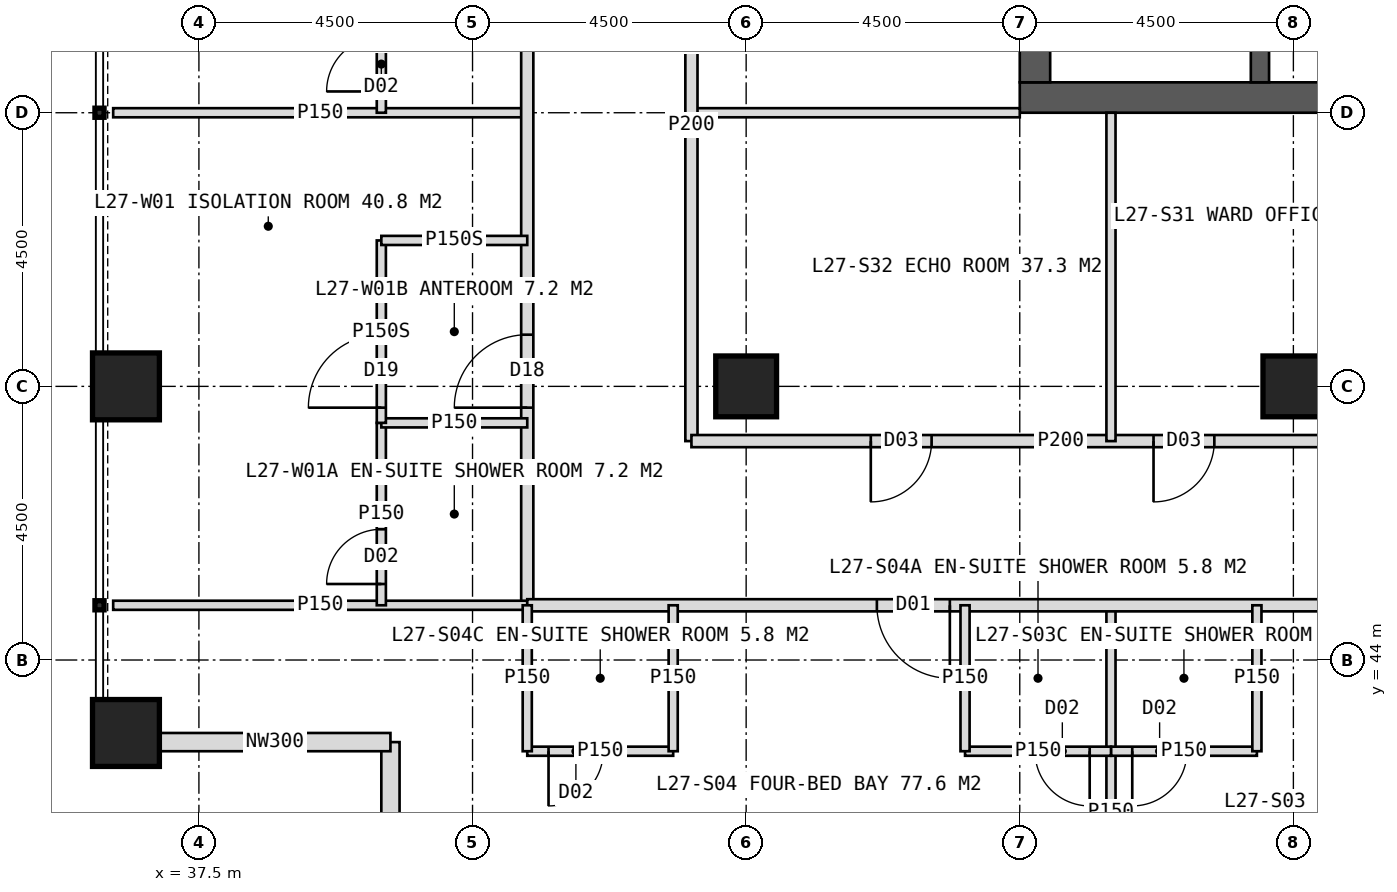
"""IFC4 building model, lengths in metres.
Left out: names, types, materials, properties, quantities, classifications, styles, units other than length and angle.
Written with IfcOpenShell. Run it as: python <this file> out.ifc"""

import sys

from ifc_helpers import new_model, si_unit, direction, frame, frame_2d, origin, origin_2d, place, context, subcontext, project, spatial, rectangle, hollow_rectangle, extrude, element, fill, save


model = new_model("IFC4")
c1 = context("Model", 3, precision=1e-05, world=origin(), true_north=direction((0.0, 1.0)))
c2 = subcontext(c1, "Body", "Model", "MODEL_VIEW")
j1 = project(units=[si_unit("LENGTHUNIT", "METRE"), si_unit("PLANEANGLEUNIT", "RADIAN")], contexts=[c1])
p1 = place(None, origin())
s1 = spatial("IfcSite", under=j1, at=p1, CompositionType="ELEMENT")
p2 = place(p1, origin())
s2 = spatial("IfcBuilding", under=s1, at=p2, CompositionType="ELEMENT")
p3 = place(p2, frame((0.0, 0.0, 116.0)))
s3 = spatial("IfcBuildingStorey", under=s2, at=p3, CompositionType="ELEMENT", Elevation=116.0)
p4 = place(p3, frame((51.0, 53.25, 0.0), z_axis=(0.0, 0.0, 1.0), x_axis=(1.0, 0.0, 0.0)))
e1 = element("IfcWall", 1, at=p4, inside=s3, PredefinedType="SHEAR", context=c2, shape_type="SweptSolid", body=[
    extrude(rectangle(XDim=18.0, YDim=0.5, at=frame_2d((9.0, 0.0))), origin(), (0.0, 0.0, 1.0), 4.0),
])
p5 = place(p4, frame((8.1, 0.0, 0.0)))
e2 = element("IfcOpeningElement", 2, at=p5, cuts=e1, PredefinedType="OPENING", context=c2, shape_type="SweptSolid", body=[
    extrude(rectangle(XDim=1.8, YDim=2.2, at=frame_2d((0.9, 1.1))), frame((0.0, 0.26, 0.0), z_axis=(0.0, -1.0, 0.0), x_axis=(1.0, 0.0, 0.0)), (0.0, 0.0, 1.0), 0.52),
])
p6 = place(p3, frame((51.25, 53.5, 0.0), z_axis=(0.0, 0.0, 1.0), x_axis=(0.0, 1.0, 0.0)))
e3 = element("IfcWall", 3, at=p6, inside=s3, PredefinedType="SHEAR", context=c2, shape_type="SweptSolid", body=[
    extrude(rectangle(XDim=17.0, YDim=0.5, at=frame_2d((8.5, 0.0))), origin(), (0.0, 0.0, 1.0), 4.0),
])
p7 = place(p6, frame((6.0, 0.0, 0.0)))
e4 = element("IfcOpeningElement", 4, at=p7, cuts=e3, PredefinedType="OPENING", context=c2, shape_type="SweptSolid", body=[
    extrude(rectangle(XDim=1.5, YDim=2.2, at=frame_2d((0.75, 1.1))), frame((0.0, 0.26, 0.0), z_axis=(0.0, -1.0, 0.0), x_axis=(1.0, 0.0, 0.0)), (0.0, 0.0, 1.0), 0.52),
])
p8 = place(p3, frame((54.95, 53.5, 0.0), z_axis=(0.0, 0.0, 1.0), x_axis=(0.0, 1.0, 0.0)))
e5 = element("IfcWall", 5, at=p8, inside=s3, PredefinedType="SHEAR", context=c2, shape_type="SweptSolid", body=[
    extrude(rectangle(XDim=17.0, YDim=0.3, at=frame_2d((8.5, 0.0))), origin(), (0.0, 0.0, 1.0), 4.0),
])
for number, where, z_axis, x_axis in (
    (6, (46.5, 48.5, 0.0), (0.0, 0.0, 1.0), (1.0, 0.0, 0.0)),
    (7, (55.5, 48.5, 0.0), (0.0, 0.0, 1.0), (1.0, 0.0, 0.0)),
):
    element("IfcColumn", number, at=place(p3, frame(where, z_axis=z_axis, x_axis=x_axis)), inside=s3, PredefinedType="COLUMN", context=c2, shape_type="SweptSolid", body=[
        extrude(hollow_rectangle(XDim=1.0, YDim=1.0, WallThickness=0.1, at=origin_2d()), origin(), (0.0, 0.0, 1.0), 4.0),
    ])
for number, where, z_axis, x_axis in (
    (8, (36.3, 42.8, 0.0), (0.0, 0.0, 1.0), (1.0, 0.0, 0.0)),
    (9, (36.3, 48.5, 0.0), (0.0, 0.0, 1.0), (1.0, 0.0, 0.0)),
):
    element("IfcColumn", number, at=place(p3, frame(where, z_axis=z_axis, x_axis=x_axis)), inside=s3, PredefinedType="COLUMN", context=c2, shape_type="SweptSolid", body=[
        extrude(hollow_rectangle(XDim=1.1, YDim=1.1, WallThickness=0.1, at=origin_2d()), origin(), (0.0, 0.0, 1.0), 4.0),
    ])
for number, where, z_axis, x_axis in (
    (10, (40.65, 38.85, 0.0), (0.0, 0.0, 1.0), (0.0, 1.0, 0.0)),
    (11, (40.65, 42.65, 0.0), (0.0, 0.0, 1.0), (-1.0, 0.0, 0.0)),
):
    element("IfcWall", number, at=place(p3, frame(where, z_axis=z_axis, x_axis=x_axis)), inside=s3, PredefinedType="ELEMENTEDWALL", context=c2, shape_type="SweptSolid", body=[
        extrude(rectangle(XDim=3.8, YDim=0.3, at=frame_2d((1.9, 0.0))), origin(), (0.0, 0.0, 1.0), 4.0),
    ])
p9 = place(p3, frame((42.9, 53.0, 0.0), z_axis=(0.0, 0.0, 1.0), x_axis=(-1.0, 0.0, 0.0)))
e12 = element("IfcWall", 12, at=p9, inside=s3, PredefinedType="PARTITIONING", context=c2, shape_type="SweptSolid", body=[
    extrude(rectangle(XDim=6.81, YDim=0.15, at=frame_2d((3.405, 0.0))), origin(), (0.0, 0.0, 1.0), 3.75),
])
p10 = place(p3, frame((42.9, 44.9, 0.0), z_axis=(0.0, 0.0, 1.0), x_axis=(0.0, 1.0, 0.0)))
e13 = element("IfcWall", 13, at=p10, inside=s3, PredefinedType="PARTITIONING", context=c2, shape_type="SweptSolid", body=[
    extrude(rectangle(XDim=34.2, YDim=0.2, at=frame_2d((17.1, 0.0))), origin(), (0.0, 0.0, 1.0), 3.75),
])
p11 = place(p10, frame((3.25, 0.0, 0.0)))
e14 = element("IfcOpeningElement", 14, at=p11, cuts=e13, PredefinedType="OPENING", context=c2, shape_type="SweptSolid", body=[
    extrude(rectangle(XDim=1.2, YDim=2.2, at=frame_2d((0.6, 1.1))), frame((0.0, 0.11, 0.0), z_axis=(0.0, -1.0, 0.0), x_axis=(1.0, 0.0, 0.0)), (0.0, 0.0, 1.0), 0.22),
])
p12 = place(p10, frame((10.75, 0.0, 0.0)))
e15 = element("IfcOpeningElement", 15, at=p12, cuts=e13, PredefinedType="OPENING", context=c2, shape_type="SweptSolid", body=[
    extrude(rectangle(XDim=1.2, YDim=2.2, at=frame_2d((0.6, 1.1))), frame((0.0, 0.11, 0.0), z_axis=(0.0, -1.0, 0.0), x_axis=(1.0, 0.0, 0.0)), (0.0, 0.0, 1.0), 0.22),
])
p13 = place(p10, frame((19.75, 0.0, 0.0)))
e16 = element("IfcOpeningElement", 16, at=p13, cuts=e13, PredefinedType="OPENING", context=c2, shape_type="SweptSolid", body=[
    extrude(rectangle(XDim=1.2, YDim=2.2, at=frame_2d((0.6, 1.1))), frame((0.0, 0.11, 0.0), z_axis=(0.0, -1.0, 0.0), x_axis=(1.0, 0.0, 0.0)), (0.0, 0.0, 1.0), 0.22),
])
p14 = place(p10, frame((28.75, 0.0, 0.0)))
e17 = element("IfcOpeningElement", 17, at=p14, cuts=e13, PredefinedType="OPENING", context=c2, shape_type="SweptSolid", body=[
    extrude(rectangle(XDim=1.2, YDim=2.2, at=frame_2d((0.6, 1.1))), frame((0.0, 0.11, 0.0), z_axis=(0.0, -1.0, 0.0), x_axis=(1.0, 0.0, 0.0)), (0.0, 0.0, 1.0), 0.22),
])
p15 = place(p3, frame((42.9, 44.9, 0.0), z_axis=(0.0, 0.0, 1.0), x_axis=(-1.0, 0.0, 0.0)))
e18 = element("IfcWall", 18, at=p15, inside=s3, PredefinedType="PARTITIONING", context=c2, shape_type="SweptSolid", body=[
    extrude(rectangle(XDim=6.81, YDim=0.15, at=frame_2d((3.405, 0.0))), origin(), (0.0, 0.0, 1.0), 3.75),
])
p16 = place(p3, frame((40.5, 44.9, 0.0), z_axis=(0.0, 0.0, 1.0), x_axis=(0.0, 1.0, 0.0)))
e19 = element("IfcWall", 19, at=p16, inside=s3, PredefinedType="PARTITIONING", context=c2, shape_type="SweptSolid", body=[
    extrude(rectangle(XDim=3.0, YDim=0.15, at=frame_2d((1.5, 0.0))), origin(), (0.0, 0.0, 1.0), 3.75),
])
p17 = place(p16, frame((0.35, 0.0, 0.0)))
e20 = element("IfcOpeningElement", 20, at=p17, cuts=e19, PredefinedType="OPENING", context=c2, shape_type="SweptSolid", body=[
    extrude(rectangle(XDim=0.9, YDim=2.1, at=frame_2d((0.45, 1.05))), frame((0.0, 0.085, 0.0), z_axis=(0.0, -1.0, 0.0), x_axis=(1.0, 0.0, 0.0)), (0.0, 0.0, 1.0), 0.17),
])
p18 = place(p3, frame((42.9, 47.9, 0.0), z_axis=(0.0, 0.0, 1.0), x_axis=(-1.0, 0.0, 0.0)))
e21 = element("IfcWall", 21, at=p18, inside=s3, PredefinedType="PARTITIONING", context=c2, shape_type="SweptSolid", body=[
    extrude(rectangle(XDim=2.4, YDim=0.15, at=frame_2d((1.2, 0.0))), origin(), (0.0, 0.0, 1.0), 3.75),
])
p19 = place(p3, frame((40.5, 47.9, 0.0), z_axis=(0.0, 0.0, 1.0), x_axis=(0.0, 1.0, 0.0)))
e22 = element("IfcWall", 22, at=p19, inside=s3, PredefinedType="PARTITIONING", context=c2, shape_type="SweptSolid", body=[
    extrude(rectangle(XDim=3.0, YDim=0.15, at=frame_2d((1.5, 0.0))), origin(), (0.0, 0.0, 1.0), 3.75),
])
p20 = place(p19, frame((0.25, 0.0, 0.0)))
e23 = element("IfcOpeningElement", 23, at=p20, cuts=e22, PredefinedType="OPENING", context=c2, shape_type="SweptSolid", body=[
    extrude(rectangle(XDim=1.2, YDim=2.2, at=frame_2d((0.6, 1.1))), frame((0.0, 0.085, 0.0), z_axis=(0.0, -1.0, 0.0), x_axis=(1.0, 0.0, 0.0)), (0.0, 0.0, 1.0), 0.17),
])
p21 = place(p3, frame((42.9, 50.9, 0.0), z_axis=(0.0, 0.0, 1.0), x_axis=(-1.0, 0.0, 0.0)))
e24 = element("IfcWall", 24, at=p21, inside=s3, PredefinedType="PARTITIONING", context=c2, shape_type="SweptSolid", body=[
    extrude(rectangle(XDim=2.4, YDim=0.15, at=frame_2d((1.2, 0.0))), origin(), (0.0, 0.0, 1.0), 3.75),
])
p22 = place(p3, frame((40.5, 53.0, 0.0), z_axis=(0.0, 0.0, 1.0), x_axis=(0.0, 1.0, 0.0)))
e25 = element("IfcWall", 25, at=p22, inside=s3, PredefinedType="PARTITIONING", context=c2, shape_type="SweptSolid", body=[
    extrude(rectangle(XDim=2.4, YDim=0.15, at=frame_2d((1.2, 0.0))), origin(), (0.0, 0.0, 1.0), 3.75),
])
p23 = place(p22, frame((0.35, 0.0, 0.0)))
e26 = element("IfcOpeningElement", 26, at=p23, cuts=e25, PredefinedType="OPENING", context=c2, shape_type="SweptSolid", body=[
    extrude(rectangle(XDim=0.9, YDim=2.1, at=frame_2d((0.45, 1.05))), frame((0.0, 0.085, 0.0), z_axis=(0.0, -1.0, 0.0), x_axis=(1.0, 0.0, 0.0)), (0.0, 0.0, 1.0), 0.17),
])
p24 = place(p3, frame((51.0, 53.0, 0.0), z_axis=(0.0, 0.0, 1.0), x_axis=(-1.0, 0.0, 0.0)))
e27 = element("IfcWall", 27, at=p24, inside=s3, PredefinedType="PARTITIONING", context=c2, shape_type="SweptSolid", body=[
    extrude(rectangle(XDim=5.4, YDim=0.15, at=frame_2d((2.7, 0.0))), origin(), (0.0, 0.0, 1.0), 3.75),
])
p25 = place(p3, frame((45.6, 47.6, 0.0), z_axis=(0.0, 0.0, 1.0), x_axis=(0.0, 1.0, 0.0)))
e28 = element("IfcWall", 28, at=p25, inside=s3, PredefinedType="PARTITIONING", context=c2, shape_type="SweptSolid", body=[
    extrude(rectangle(XDim=10.4, YDim=0.2, at=frame_2d((5.2, 0.0))), origin(), (0.0, 0.0, 1.0), 3.75),
])
p26 = place(p25, frame((7.4, 0.0, 0.0)))
e29 = element("IfcOpeningElement", 29, at=p26, cuts=e28, PredefinedType="OPENING", context=c2, shape_type="SweptSolid", body=[
    extrude(rectangle(XDim=1.0, YDim=2.1, at=frame_2d((0.5, 1.05))), frame((0.0, 0.11, 0.0), z_axis=(0.0, -1.0, 0.0), x_axis=(1.0, 0.0, 0.0)), (0.0, 0.0, 1.0), 0.22),
])
p27 = place(p3, frame((52.5, 44.9, 0.0), z_axis=(0.0, 0.0, 1.0), x_axis=(0.0, -1.0, 0.0)))
e30 = element("IfcWall", 30, at=p27, inside=s3, PredefinedType="PARTITIONING", context=c2, shape_type="SweptSolid", body=[
    extrude(rectangle(XDim=6.81, YDim=0.15, at=frame_2d((3.405, 0.0))), origin(), (0.0, 0.0, 1.0), 3.75),
])
p28 = place(p3, frame((77.1, 44.9, 0.0), z_axis=(0.0, 0.0, 1.0), x_axis=(-1.0, 0.0, 0.0)))
e31 = element("IfcWall", 31, at=p28, inside=s3, PredefinedType="PARTITIONING", context=c2, shape_type="SweptSolid", body=[
    extrude(rectangle(XDim=34.2, YDim=0.2, at=frame_2d((17.1, 0.0))), origin(), (0.0, 0.0, 1.0), 3.75),
])
p29 = place(p28, frame((3.25, 0.0, 0.0)))
e32 = element("IfcOpeningElement", 32, at=p29, cuts=e31, PredefinedType="OPENING", context=c2, shape_type="SweptSolid", body=[
    extrude(rectangle(XDim=1.2, YDim=2.2, at=frame_2d((0.6, 1.1))), frame((0.0, 0.11, 0.0), z_axis=(0.0, -1.0, 0.0), x_axis=(1.0, 0.0, 0.0)), (0.0, 0.0, 1.0), 0.22),
])
p30 = place(p28, frame((9.25, 0.0, 0.0)))
e33 = element("IfcOpeningElement", 33, at=p30, cuts=e31, PredefinedType="OPENING", context=c2, shape_type="SweptSolid", body=[
    extrude(rectangle(XDim=1.2, YDim=2.2, at=frame_2d((0.6, 1.1))), frame((0.0, 0.11, 0.0), z_axis=(0.0, -1.0, 0.0), x_axis=(1.0, 0.0, 0.0)), (0.0, 0.0, 1.0), 0.22),
])
p31 = place(p28, frame((18.25, 0.0, 0.0)))
e34 = element("IfcOpeningElement", 34, at=p31, cuts=e31, PredefinedType="OPENING", context=c2, shape_type="SweptSolid", body=[
    extrude(rectangle(XDim=1.2, YDim=2.2, at=frame_2d((0.6, 1.1))), frame((0.0, 0.11, 0.0), z_axis=(0.0, -1.0, 0.0), x_axis=(1.0, 0.0, 0.0)), (0.0, 0.0, 1.0), 0.22),
])
p32 = place(p28, frame((27.25, 0.0, 0.0)))
e35 = element("IfcOpeningElement", 35, at=p32, cuts=e31, PredefinedType="OPENING", context=c2, shape_type="SweptSolid", body=[
    extrude(rectangle(XDim=1.2, YDim=2.2, at=frame_2d((0.6, 1.1))), frame((0.0, 0.11, 0.0), z_axis=(0.0, -1.0, 0.0), x_axis=(1.0, 0.0, 0.0)), (0.0, 0.0, 1.0), 0.22),
])
p33 = place(p3, frame((54.9, 42.5, 0.0), z_axis=(0.0, 0.0, 1.0), x_axis=(-1.0, 0.0, 0.0)))
e36 = element("IfcWall", 36, at=p33, inside=s3, PredefinedType="PARTITIONING", context=c2, shape_type="SweptSolid", body=[
    extrude(rectangle(XDim=2.4, YDim=0.15, at=frame_2d((1.2, 0.0))), origin(), (0.0, 0.0, 1.0), 3.75),
])
p34 = place(p33, frame((1.15, 0.0, 0.0)))
e37 = element("IfcOpeningElement", 37, at=p34, cuts=e36, PredefinedType="OPENING", context=c2, shape_type="SweptSolid", body=[
    extrude(rectangle(XDim=0.9, YDim=2.1, at=frame_2d((0.45, 1.05))), frame((0.0, 0.085, 0.0), z_axis=(0.0, -1.0, 0.0), x_axis=(1.0, 0.0, 0.0)), (0.0, 0.0, 1.0), 0.17),
])
p35 = place(p3, frame((54.9, 44.9, 0.0), z_axis=(0.0, 0.0, 1.0), x_axis=(0.0, -1.0, 0.0)))
e38 = element("IfcWall", 38, at=p35, inside=s3, PredefinedType="PARTITIONING", context=c2, shape_type="SweptSolid", body=[
    extrude(rectangle(XDim=2.4, YDim=0.15, at=frame_2d((1.2, 0.0))), origin(), (0.0, 0.0, 1.0), 3.75),
])
p36 = place(p3, frame((52.5, 42.5, 0.0), z_axis=(0.0, 0.0, 1.0), x_axis=(-1.0, 0.0, 0.0)))
e39 = element("IfcWall", 39, at=p36, inside=s3, PredefinedType="PARTITIONING", context=c2, shape_type="SweptSolid", body=[
    extrude(rectangle(XDim=2.4, YDim=0.15, at=frame_2d((1.2, 0.0))), origin(), (0.0, 0.0, 1.0), 3.75),
])
p37 = place(p36, frame((0.35, 0.0, 0.0)))
e40 = element("IfcOpeningElement", 40, at=p37, cuts=e39, PredefinedType="OPENING", context=c2, shape_type="SweptSolid", body=[
    extrude(rectangle(XDim=0.9, YDim=2.1, at=frame_2d((0.45, 1.05))), frame((0.0, 0.085, 0.0), z_axis=(0.0, -1.0, 0.0), x_axis=(1.0, 0.0, 0.0)), (0.0, 0.0, 1.0), 0.17),
])
p38 = place(p3, frame((50.1, 44.9, 0.0), z_axis=(0.0, 0.0, 1.0), x_axis=(0.0, -1.0, 0.0)))
e41 = element("IfcWall", 41, at=p38, inside=s3, PredefinedType="PARTITIONING", context=c2, shape_type="SweptSolid", body=[
    extrude(rectangle(XDim=2.4, YDim=0.15, at=frame_2d((1.2, 0.0))), origin(), (0.0, 0.0, 1.0), 3.75),
])
p39 = place(p3, frame((45.3, 42.5, 0.0), z_axis=(0.0, 0.0, 1.0), x_axis=(-1.0, 0.0, 0.0)))
e42 = element("IfcWall", 42, at=p39, inside=s3, PredefinedType="PARTITIONING", context=c2, shape_type="SweptSolid", body=[
    extrude(rectangle(XDim=2.4, YDim=0.15, at=frame_2d((1.2, 0.0))), origin(), (0.0, 0.0, 1.0), 3.75),
])
p40 = place(p39, frame((1.15, 0.0, 0.0)))
e43 = element("IfcOpeningElement", 43, at=p40, cuts=e42, PredefinedType="OPENING", context=c2, shape_type="SweptSolid", body=[
    extrude(rectangle(XDim=0.9, YDim=2.1, at=frame_2d((0.45, 1.05))), frame((0.0, 0.085, 0.0), z_axis=(0.0, -1.0, 0.0), x_axis=(1.0, 0.0, 0.0)), (0.0, 0.0, 1.0), 0.17),
])
for number, where, z_axis, x_axis in (
    (44, (45.3, 44.9, 0.0), (0.0, 0.0, 1.0), (0.0, -1.0, 0.0)),
    (45, (42.9, 44.9, 0.0), (0.0, 0.0, 1.0), (0.0, -1.0, 0.0)),
):
    element("IfcWall", number, at=place(p3, frame(where, z_axis=z_axis, x_axis=x_axis)), inside=s3, PredefinedType="PARTITIONING", context=c2, shape_type="SweptSolid", body=[
        extrude(rectangle(XDim=2.4, YDim=0.15, at=frame_2d((1.2, 0.0))), origin(), (0.0, 0.0, 1.0), 3.75),
    ])
p41 = place(p3, frame((57.75, 47.6, 0.0), z_axis=(0.0, 0.0, 1.0), x_axis=(-1.0, 0.0, 0.0)))
e46 = element("IfcWall", 46, at=p41, inside=s3, PredefinedType="PARTITIONING", context=c2, shape_type="SweptSolid", body=[
    extrude(rectangle(XDim=12.15, YDim=0.2, at=frame_2d((6.075, 0.0))), origin(), (0.0, 0.0, 1.0), 3.75),
])
p42 = place(p41, frame((3.55, 0.0, 0.0)))
e47 = element("IfcOpeningElement", 47, at=p42, cuts=e46, PredefinedType="OPENING", context=c2, shape_type="SweptSolid", body=[
    extrude(rectangle(XDim=1.0, YDim=2.1, at=frame_2d((0.5, 1.05))), frame((0.0, 0.11, 0.0), z_axis=(0.0, -1.0, 0.0), x_axis=(1.0, 0.0, 0.0)), (0.0, 0.0, 1.0), 0.22),
])
p43 = place(p41, frame((8.2, 0.0, 0.0)))
e48 = element("IfcOpeningElement", 48, at=p43, cuts=e46, PredefinedType="OPENING", context=c2, shape_type="SweptSolid", body=[
    extrude(rectangle(XDim=1.0, YDim=2.1, at=frame_2d((0.5, 1.05))), frame((0.0, 0.11, 0.0), z_axis=(0.0, -1.0, 0.0), x_axis=(1.0, 0.0, 0.0)), (0.0, 0.0, 1.0), 0.22),
])
p44 = place(p3, frame((52.5, 53.0, 0.0), z_axis=(0.0, 0.0, 1.0), x_axis=(0.0, -1.0, 0.0)))
e49 = element("IfcWall", 49, at=p44, inside=s3, PredefinedType="PARTITIONING", context=c2, shape_type="SweptSolid", body=[
    extrude(rectangle(XDim=5.4, YDim=0.15, at=frame_2d((2.7, 0.0))), origin(), (0.0, 0.0, 1.0), 3.75),
])
p45 = place(p20, origin())
e50 = element("IfcDoor", 50, at=p45, inside=s3, OperationType="SINGLE_SWING_LEFT", PredefinedType="DOOR", context=c2, shape_type="SweptSolid", body=[
    extrude(rectangle(XDim=1.2, YDim=2.2, at=frame_2d((0.6, 1.1))), frame((0.0, 0.025, 0.0), z_axis=(0.0, -1.0, 0.0), x_axis=(1.0, 0.0, 0.0)), (0.0, 0.0, 1.0), 0.05),
])
fill(e23, e50)
p46 = place(p11, origin())
e51 = element("IfcDoor", 51, at=p46, inside=s3, OperationType="SINGLE_SWING_LEFT", PredefinedType="DOOR", context=c2, shape_type="SweptSolid", body=[
    extrude(rectangle(XDim=1.2, YDim=2.2, at=frame_2d((0.6, 1.1))), frame((0.0, 0.025, 0.0), z_axis=(0.0, -1.0, 0.0), x_axis=(1.0, 0.0, 0.0)), (0.0, 0.0, 1.0), 0.05),
])
fill(e14, e51)
p47 = place(p17, origin())
e52 = element("IfcDoor", 52, at=p47, inside=s3, OperationType="SINGLE_SWING_LEFT", PredefinedType="DOOR", context=c2, shape_type="SweptSolid", body=[
    extrude(rectangle(XDim=0.9, YDim=2.1, at=frame_2d((0.45, 1.05))), frame((0.0, 0.025, 0.0), z_axis=(0.0, -1.0, 0.0), x_axis=(1.0, 0.0, 0.0)), (0.0, 0.0, 1.0), 0.05),
])
fill(e20, e52)
p48 = place(p23, origin())
e53 = element("IfcDoor", 53, at=p48, inside=s3, OperationType="SINGLE_SWING_LEFT", PredefinedType="DOOR", context=c2, shape_type="SweptSolid", body=[
    extrude(rectangle(XDim=0.9, YDim=2.1, at=frame_2d((0.45, 1.05))), frame((0.0, 0.025, 0.0), z_axis=(0.0, -1.0, 0.0), x_axis=(1.0, 0.0, 0.0)), (0.0, 0.0, 1.0), 0.05),
])
fill(e26, e53)
p49 = place(p34, origin())
e54 = element("IfcDoor", 54, at=p49, inside=s3, OperationType="SINGLE_SWING_RIGHT", PredefinedType="DOOR", context=c2, shape_type="SweptSolid", body=[
    extrude(rectangle(XDim=0.9, YDim=2.1, at=frame_2d((0.45, 1.05))), frame((0.0, 0.025, 0.0), z_axis=(0.0, -1.0, 0.0), x_axis=(1.0, 0.0, 0.0)), (0.0, 0.0, 1.0), 0.05),
])
fill(e37, e54)
p50 = place(p32, origin())
e55 = element("IfcDoor", 55, at=p50, inside=s3, OperationType="SINGLE_SWING_LEFT", PredefinedType="DOOR", context=c2, shape_type="SweptSolid", body=[
    extrude(rectangle(XDim=1.2, YDim=2.2, at=frame_2d((0.6, 1.1))), frame((0.0, 0.025, 0.0), z_axis=(0.0, -1.0, 0.0), x_axis=(1.0, 0.0, 0.0)), (0.0, 0.0, 1.0), 0.05),
])
fill(e35, e55)
p51 = place(p37, origin())
e56 = element("IfcDoor", 56, at=p51, inside=s3, OperationType="SINGLE_SWING_LEFT", PredefinedType="DOOR", context=c2, shape_type="SweptSolid", body=[
    extrude(rectangle(XDim=0.9, YDim=2.1, at=frame_2d((0.45, 1.05))), frame((0.0, 0.025, 0.0), z_axis=(0.0, -1.0, 0.0), x_axis=(1.0, 0.0, 0.0)), (0.0, 0.0, 1.0), 0.05),
])
fill(e40, e56)
p52 = place(p40, origin())
e57 = element("IfcDoor", 57, at=p52, inside=s3, OperationType="SINGLE_SWING_RIGHT", PredefinedType="DOOR", context=c2, shape_type="SweptSolid", body=[
    extrude(rectangle(XDim=0.9, YDim=2.1, at=frame_2d((0.45, 1.05))), frame((0.0, 0.025, 0.0), z_axis=(0.0, -1.0, 0.0), x_axis=(1.0, 0.0, 0.0)), (0.0, 0.0, 1.0), 0.05),
])
fill(e43, e57)
p53 = place(p42, origin())
e58 = element("IfcDoor", 58, at=p53, inside=s3, OperationType="SINGLE_SWING_RIGHT", PredefinedType="DOOR", context=c2, shape_type="SweptSolid", body=[
    extrude(rectangle(XDim=1.0, YDim=2.1, at=frame_2d((0.5, 1.05))), frame((0.0, 0.025, 0.0), z_axis=(0.0, -1.0, 0.0), x_axis=(1.0, 0.0, 0.0)), (0.0, 0.0, 1.0), 0.05),
])
fill(e47, e58)
p54 = place(p43, origin())
e59 = element("IfcDoor", 59, at=p54, inside=s3, OperationType="SINGLE_SWING_RIGHT", PredefinedType="DOOR", context=c2, shape_type="SweptSolid", body=[
    extrude(rectangle(XDim=1.0, YDim=2.1, at=frame_2d((0.5, 1.05))), frame((0.0, 0.025, 0.0), z_axis=(0.0, -1.0, 0.0), x_axis=(1.0, 0.0, 0.0)), (0.0, 0.0, 1.0), 0.05),
])
fill(e48, e59)
save(model, sys.argv[1])
